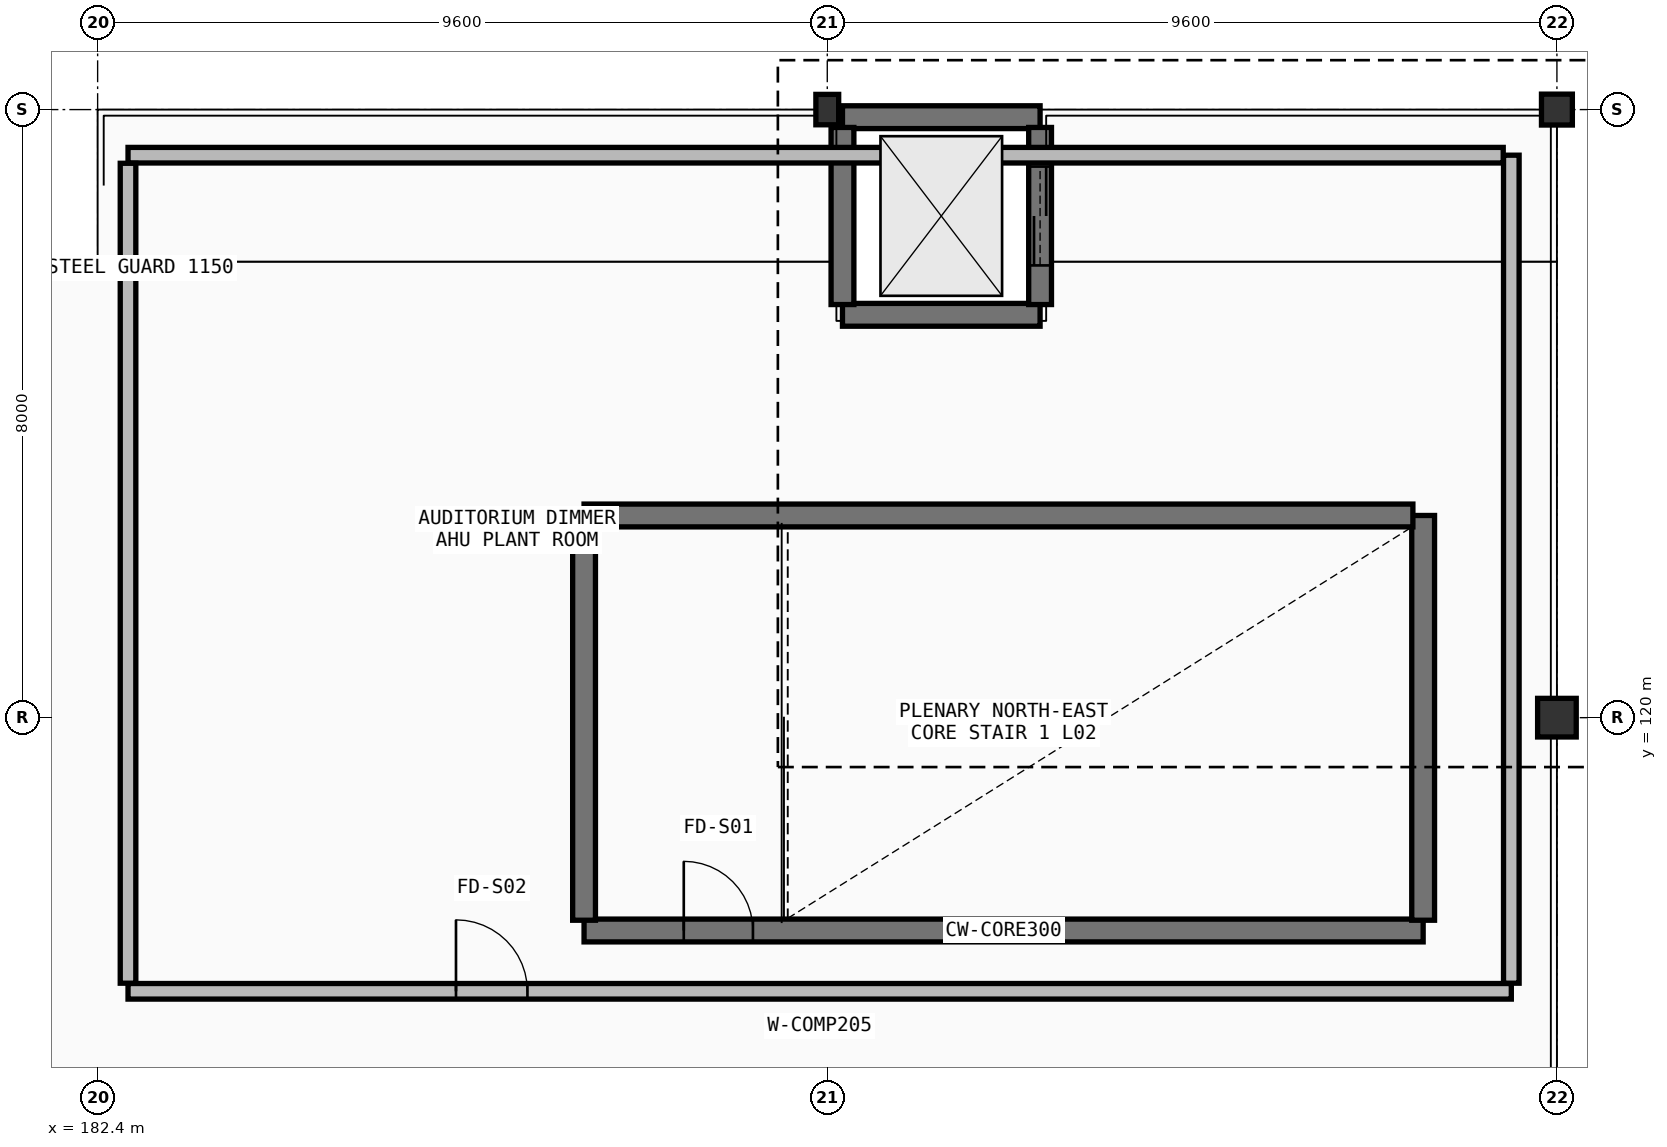
"""IFC4 building model, lengths in metres.
Left out: names, types, materials, properties, quantities, classifications, styles, units other than length and angle.
Written with IfcOpenShell. Run it as: python <this file> out.ifc"""

import sys

from ifc_helpers import new_model, si_unit, direction, frame, frame_2d, origin, origin_2d, place, context, subcontext, project, spatial, rectangle, hollow_circle, i_section, extrude, element, fill, save


model = new_model("IFC4")
c1 = context("Model", 3, precision=1e-05, world=origin(), true_north=direction((0.0, 1.0)))
c2 = subcontext(c1, "Body", "Model", "MODEL_VIEW")
j1 = project(units=[si_unit("LENGTHUNIT", "METRE"), si_unit("PLANEANGLEUNIT", "RADIAN")], contexts=[c1])
p1 = place(None, origin())
s1 = spatial("IfcSite", under=j1, at=p1, CompositionType="ELEMENT")
p2 = place(p1, origin())
s2 = spatial("IfcBuilding", under=s1, at=p2, CompositionType="ELEMENT")
p3 = place(p2, frame((0.0, 0.0, 11.4)))
s3 = spatial("IfcBuildingStorey", under=s2, at=p3, CompositionType="ELEMENT", Elevation=11.4)
p4 = place(p3, frame((192.0, 128.0, 0.0), z_axis=(0.0, 0.0, 1.0), x_axis=(1.0, 0.0, 0.0)))
e1 = element("IfcColumn", 1, at=p4, inside=s3, PredefinedType="COLUMN", context=c2, shape_type="SweptSolid", body=[
    extrude(i_section(OverallWidth=0.3, OverallDepth=0.4, WebThickness=0.013, FlangeThickness=0.024, FilletRadius=0.027, at=origin_2d()), origin(), (0.0, 0.0, 1.0), 4.5),
])
p5 = place(p3, frame((201.6, 120.0, 0.0), z_axis=(0.0, 0.0, 1.0), x_axis=(1.0, 0.0, 0.0)))
e2 = element("IfcColumn", 2, at=p5, inside=s3, PredefinedType="COLUMN", context=c2, shape_type="SweptSolid", body=[
    extrude(hollow_circle(Radius=0.254, WallThickness=0.025, at=origin_2d()), origin(), (0.0, 0.0, 1.0), 7.27),
])
p6 = place(p3, frame((201.6, 128.0, 0.0), z_axis=(0.0, 0.0, 1.0), x_axis=(1.0, 0.0, 0.0)))
e3 = element("IfcColumn", 3, at=p6, inside=s3, PredefinedType="COLUMN", context=c2, shape_type="SweptSolid", body=[
    extrude(hollow_circle(Radius=0.203, WallThickness=0.02, at=origin_2d()), origin(), (0.0, 0.0, 1.0), 7.27),
])
p7 = place(p3, frame((188.8, 117.2, 0.0), z_axis=(0.0, 0.0, 1.0), x_axis=(1.0, 0.0, 0.0)))
e4 = element("IfcWall", 4, at=p7, inside=s3, PredefinedType="SHEAR", context=c2, shape_type="SweptSolid", body=[
    extrude(rectangle(XDim=11.04, YDim=0.3, at=frame_2d((5.52, 0.0))), origin(), (0.0, 0.0, 1.0), 3.835),
])
p8 = place(p7, frame((1.312, 0.0, 0.0)))
e5 = element("IfcOpeningElement", 5, at=p8, cuts=e4, PredefinedType="OPENING", context=c2, shape_type="SweptSolid", body=[
    extrude(rectangle(XDim=0.91, YDim=2.08, at=frame_2d((0.455, 1.04))), frame((0.0, 0.16, 0.0), z_axis=(0.0, -1.0, 0.0), x_axis=(1.0, 0.0, 0.0)), (0.0, 0.0, 1.0), 0.32),
])
p9 = place(p3, frame((199.84, 117.335, 0.0), z_axis=(0.0, 0.0, 1.0), x_axis=(0.0, 1.0, 0.0)))
e6 = element("IfcWall", 6, at=p9, inside=s3, PredefinedType="SHEAR", context=c2, shape_type="SweptSolid", body=[
    extrude(rectangle(XDim=5.325, YDim=0.3, at=frame_2d((2.663, 0.0))), origin(), (0.0, 0.0, 1.0), 3.835),
])
p10 = place(p3, frame((199.705, 122.66, 0.0), z_axis=(0.0, 0.0, 1.0), x_axis=(-1.0, 0.0, 0.0)))
e7 = element("IfcWall", 7, at=p10, inside=s3, PredefinedType="SHEAR", context=c2, shape_type="SweptSolid", body=[
    extrude(rectangle(XDim=10.905, YDim=0.3, at=frame_2d((5.453, 0.0))), origin(), (0.0, 0.0, 1.0), 3.835),
])
p11 = place(p3, frame((188.8, 122.525, 0.0), z_axis=(0.0, 0.0, 1.0), x_axis=(0.0, -1.0, 0.0)))
e8 = element("IfcWall", 8, at=p11, inside=s3, PredefinedType="SHEAR", context=c2, shape_type="SweptSolid", body=[
    extrude(rectangle(XDim=5.19, YDim=0.3, at=frame_2d((2.595, 0.0))), origin(), (0.0, 0.0, 1.0), 3.835),
])
for number, where, z_axis, x_axis in (
    (9, (194.8, 127.9, 0.0), (0.0, 0.0, 1.0), (-1.0, 0.0, 0.0)),
    (10, (192.2, 125.3, 0.0), (0.0, 0.0, 1.0), (1.0, 0.0, 0.0)),
):
    element("IfcWall", number, at=place(p3, frame(where, z_axis=z_axis, x_axis=x_axis)), inside=s3, PredefinedType="SHEAR", context=c2, shape_type="SweptSolid", body=[
        extrude(rectangle(XDim=2.6, YDim=0.3, at=frame_2d((1.3, 0.0))), origin(), (0.0, 0.0, 1.0), 3.835),
    ])
p12 = place(p3, frame((194.8, 125.435, 0.0), z_axis=(0.0, 0.0, 1.0), x_axis=(0.0, 1.0, 0.0)))
e11 = element("IfcWall", 11, at=p12, inside=s3, PredefinedType="SHEAR", context=c2, shape_type="SweptSolid", body=[
    extrude(rectangle(XDim=2.33, YDim=0.3, at=frame_2d((1.165, 0.0))), origin(), (0.0, 0.0, 1.0), 3.835),
])
p13 = place(p12, frame((0.515, 0.0, 0.0)))
e12 = element("IfcOpeningElement", 12, at=p13, cuts=e11, PredefinedType="OPENING", context=c2, shape_type="SweptSolid", body=[
    extrude(rectangle(XDim=1.3, YDim=2.22, at=frame_2d((0.65, 1.11))), frame((0.0, 0.16, 0.0), z_axis=(0.0, -1.0, 0.0), x_axis=(1.0, 0.0, 0.0)), (0.0, 0.0, 1.0), 0.32),
])
p14 = place(p3, frame((192.2, 127.765, 0.0), z_axis=(0.0, 0.0, 1.0), x_axis=(0.0, -1.0, 0.0)))
e13 = element("IfcWall", 13, at=p14, inside=s3, PredefinedType="SHEAR", context=c2, shape_type="SweptSolid", body=[
    extrude(rectangle(XDim=2.33, YDim=0.3, at=frame_2d((1.165, 0.0))), origin(), (0.0, 0.0, 1.0), 3.835),
])
p15 = place(p3, frame((182.8, 116.4, 0.0), z_axis=(0.0, 0.0, 1.0), x_axis=(1.0, 0.0, 0.0)))
e14 = element("IfcWall", 14, at=p15, inside=s3, PredefinedType="SOLIDWALL", context=c2, shape_type="SweptSolid", body=[
    extrude(rectangle(XDim=18.2, YDim=0.205, at=frame_2d((9.1, 0.0))), origin(), (0.0, 0.0, 1.0), 3.835),
])
p16 = place(p15, frame((4.315, 0.0, 0.0)))
e15 = element("IfcOpeningElement", 15, at=p16, cuts=e14, PredefinedType="OPENING", context=c2, shape_type="SweptSolid", body=[
    extrude(rectangle(XDim=0.94, YDim=2.1, at=frame_2d((0.47, 1.05))), frame((0.0, 0.113, 0.0), z_axis=(0.0, -1.0, 0.0), x_axis=(1.0, 0.0, 0.0)), (0.0, 0.0, 1.0), 0.225),
])
p17 = place(p3, frame((201.0, 116.507, 0.0), z_axis=(0.0, 0.0, 1.0), x_axis=(0.0, 1.0, 0.0)))
e16 = element("IfcWall", 16, at=p17, inside=s3, PredefinedType="SOLIDWALL", context=c2, shape_type="SweptSolid", body=[
    extrude(rectangle(XDim=10.893, YDim=0.205, at=frame_2d((5.447, 0.0))), origin(), (0.0, 0.0, 1.0), 3.835),
])
p18 = place(p3, frame((200.894, 127.4, 0.0), z_axis=(0.0, 0.0, 1.0), x_axis=(-1.0, 0.0, 0.0)))
e17 = element("IfcWall", 17, at=p18, inside=s3, PredefinedType="SOLIDWALL", context=c2, shape_type="SweptSolid", body=[
    extrude(rectangle(XDim=18.094, YDim=0.205, at=frame_2d((9.047, 0.0))), origin(), (0.0, 0.0, 1.0), 3.835),
])
p19 = place(p3, frame((182.8, 127.293, 0.0), z_axis=(0.0, 0.0, 1.0), x_axis=(0.0, -1.0, 0.0)))
e18 = element("IfcWall", 18, at=p19, inside=s3, PredefinedType="SOLIDWALL", context=c2, shape_type="SweptSolid", body=[
    extrude(rectangle(XDim=10.787, YDim=0.205, at=frame_2d((5.394, 0.0))), origin(), (0.0, 0.0, 1.0), 3.835),
])
p20 = place(p8, origin())
e19 = element("IfcDoor", 19, at=p20, inside=s3, OperationType="SINGLE_SWING_LEFT", PredefinedType="DOOR", context=c2, shape_type="SweptSolid", body=[
    extrude(rectangle(XDim=0.91, YDim=2.08, at=frame_2d((0.455, 1.04))), frame((0.0, 0.025, 0.0), z_axis=(0.0, -1.0, 0.0), x_axis=(1.0, 0.0, 0.0)), (0.0, 0.0, 1.0), 0.05),
])
fill(e5, e19)
p21 = place(p13, origin())
e20 = element("IfcDoor", 20, at=p21, inside=s3, OperationType="DOUBLE_DOOR_SLIDING", PredefinedType="DOOR", context=c2, shape_type="SweptSolid", body=[
    extrude(rectangle(XDim=1.3, YDim=2.22, at=frame_2d((0.65, 1.11))), frame((0.0, 0.025, 0.0), z_axis=(0.0, -1.0, 0.0), x_axis=(1.0, 0.0, 0.0)), (0.0, 0.0, 1.0), 0.05),
])
fill(e12, e20)
p22 = place(p16, origin())
e21 = element("IfcDoor", 21, at=p22, inside=s3, OperationType="SINGLE_SWING_LEFT", PredefinedType="DOOR", context=c2, shape_type="SweptSolid", body=[
    extrude(rectangle(XDim=0.94, YDim=2.1, at=frame_2d((0.47, 1.05))), frame((0.0, 0.025, 0.0), z_axis=(0.0, -1.0, 0.0), x_axis=(1.0, 0.0, 0.0)), (0.0, 0.0, 1.0), 0.05),
])
fill(e15, e21)
save(model, sys.argv[1])
